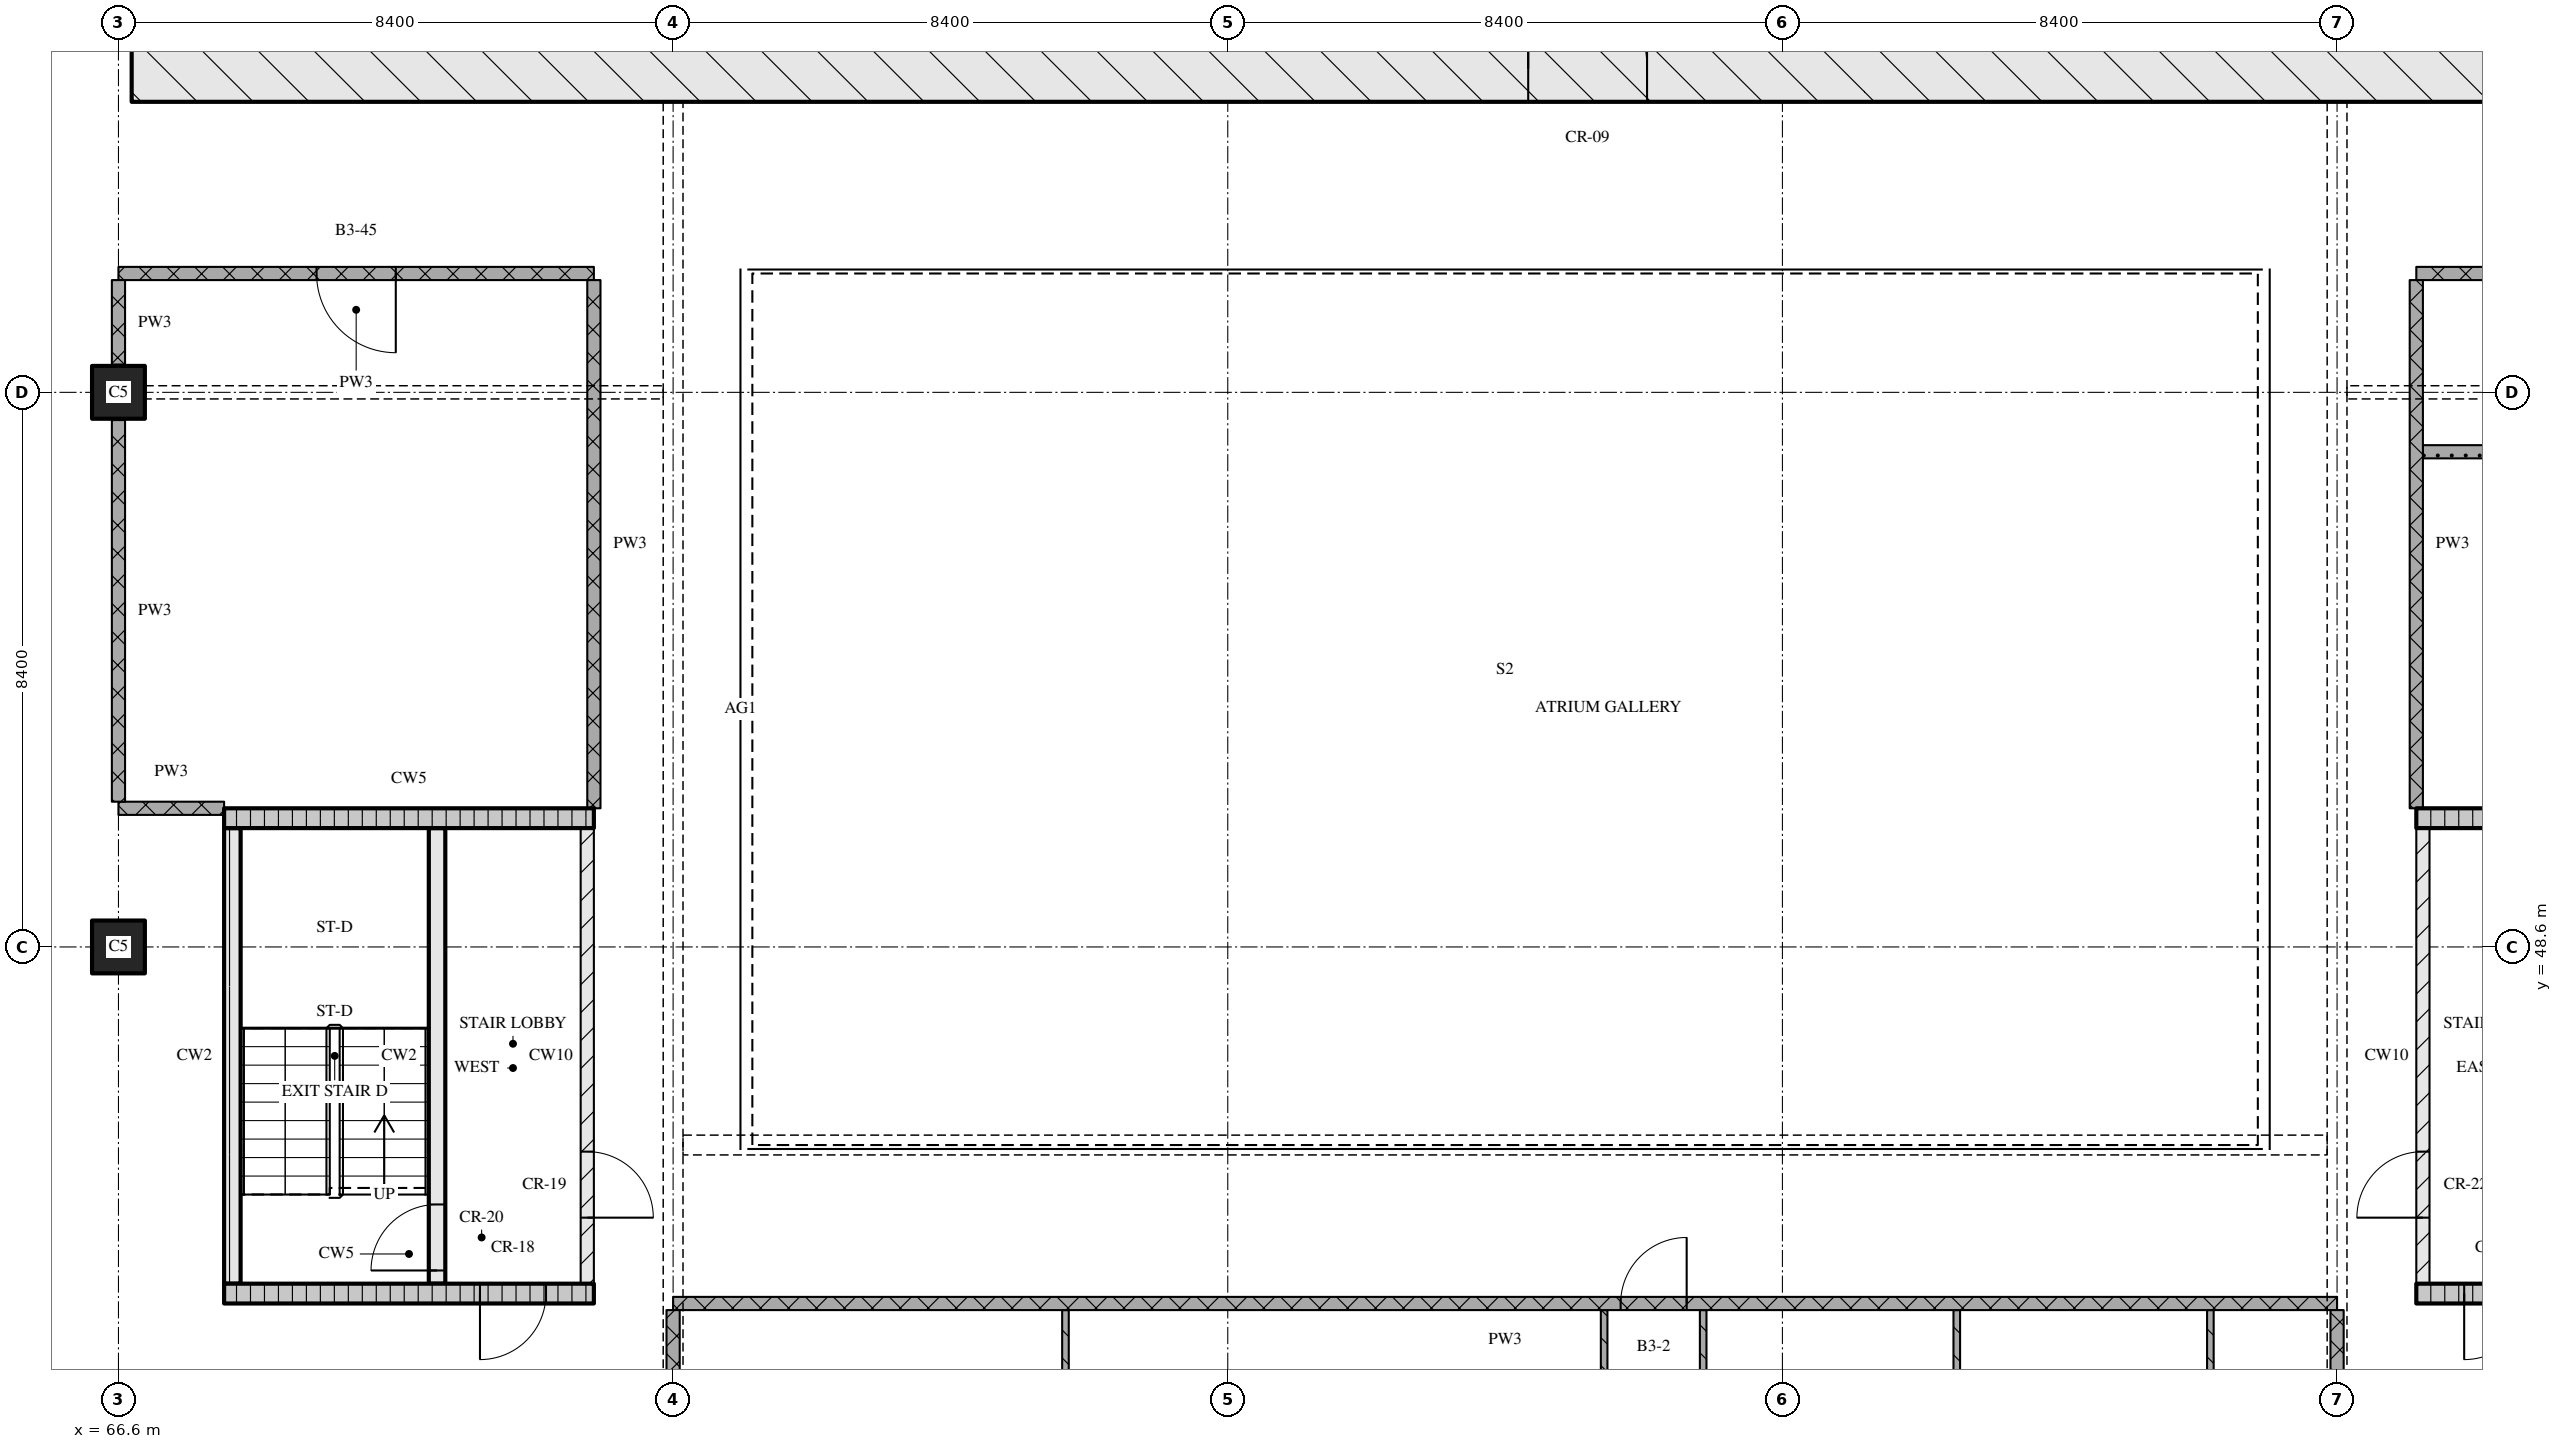
"""IFC4 building model, lengths in metres.
Left out: names, types, materials, properties, quantities, classifications, styles, units other than length and angle.
Written with IfcOpenShell. Run it as: python <this file> out.ifc"""

import sys

from ifc_helpers import new_model, si_unit, direction, frame, frame_2d, origin, origin_2d, place, context, subcontext, project, spatial, rectangle, extrude, element, fill, save


model = new_model("IFC4")
c1 = context("Model", 3, precision=1e-05, world=origin(), true_north=direction((0.0, 1.0)))
c2 = subcontext(c1, "Body", "Model", "MODEL_VIEW")
j1 = project(units=[si_unit("LENGTHUNIT", "METRE"), si_unit("PLANEANGLEUNIT", "RADIAN")], contexts=[c1])
p1 = place(None, origin())
s1 = spatial("IfcSite", under=j1, at=p1, CompositionType="ELEMENT")
p2 = place(p1, origin())
s2 = spatial("IfcBuilding", under=s1, at=p2, CompositionType="ELEMENT")
p3 = place(p2, frame((0.0, 0.0, 116.85)))
s3 = spatial("IfcBuildingStorey", under=s2, at=p3, CompositionType="ELEMENT", Elevation=116.85)
for number, where, z_axis, x_axis in (
    (1, (66.6, 48.6, 0.0), (0.0, 0.0, 1.0), (1.0, 0.0, 0.0)),
    (2, (66.6, 57.0, 0.0), (0.0, 0.0, 1.0), (1.0, 0.0, 0.0)),
):
    element("IfcColumn", number, at=place(p3, frame(where, z_axis=z_axis, x_axis=x_axis)), inside=s3, PredefinedType="COLUMN", context=c2, shape_type="SweptSolid", body=[
        extrude(rectangle(XDim=0.8, YDim=0.8, at=origin_2d()), origin(), (0.0, 0.0, 1.0), 3.6),
    ])
p4 = place(p3, frame((66.8, 61.9, 0.0), z_axis=(0.0, 0.0, 1.0), x_axis=(1.0, 0.0, 0.0)))
e3 = element("IfcWall", 3, at=p4, inside=s3, PredefinedType="SOLIDWALL", context=c2, shape_type="SweptSolid", body=[
    extrude(rectangle(XDim=41.6, YDim=1.0, at=frame_2d((20.8, 0.0))), origin(), (0.0, 0.0, 1.0), 3.32),
])
p5 = place(p4, frame((21.15, 0.0, 0.0)))
e4 = element("IfcOpeningElement", 4, at=p5, cuts=e3, PredefinedType="OPENING", context=c2, shape_type="SweptSolid", body=[
    extrude(rectangle(XDim=1.8, YDim=2.1, at=frame_2d((0.9, 1.05))), frame((0.0, 0.51, 0.0), z_axis=(0.0, -1.0, 0.0), x_axis=(1.0, 0.0, 0.0)), (0.0, 0.0, 1.0), 1.02),
])
p6 = place(p3, frame((68.2, 43.35, 0.0), z_axis=(0.0, 0.0, 1.0), x_axis=(1.0, 0.0, 0.0)))
e5 = element("IfcWall", 5, at=p6, inside=s3, PredefinedType="SOLIDWALL", context=c2, shape_type="SweptSolid", body=[
    extrude(rectangle(XDim=5.6, YDim=0.3, at=frame_2d((2.8, 0.0))), origin(), (0.0, 0.0, 1.0), 3.32),
])
p7 = place(p6, frame((3.875, 0.0, 0.0)))
e6 = element("IfcOpeningElement", 6, at=p7, cuts=e5, PredefinedType="OPENING", context=c2, shape_type="SweptSolid", body=[
    extrude(rectangle(XDim=1.0, YDim=2.1, at=frame_2d((0.5, 1.05))), frame((0.0, 0.16, 0.0), z_axis=(0.0, -1.0, 0.0), x_axis=(1.0, 0.0, 0.0)), (0.0, 0.0, 1.0), 0.32),
])
p8 = place(p3, frame((68.325, 43.5, 0.0), z_axis=(0.0, 0.0, 1.0), x_axis=(0.0, 1.0, 0.0)))
e7 = element("IfcWall", 7, at=p8, inside=s3, PredefinedType="SOLIDWALL", context=c2, shape_type="SweptSolid", body=[
    extrude(rectangle(XDim=6.9, YDim=0.25, at=frame_2d((3.45, 0.0))), origin(), (0.0, 0.0, 1.0), 3.32),
])
p9 = place(p3, frame((71.425, 43.5, 0.0), z_axis=(0.0, 0.0, 1.0), x_axis=(0.0, 1.0, 0.0)))
e8 = element("IfcWall", 8, at=p9, inside=s3, PredefinedType="SOLIDWALL", context=c2, shape_type="SweptSolid", body=[
    extrude(rectangle(XDim=6.9, YDim=0.25, at=frame_2d((3.45, 0.0))), origin(), (0.0, 0.0, 1.0), 3.32),
])
p10 = place(p9, frame((0.2, 0.0, 0.0)))
e9 = element("IfcOpeningElement", 9, at=p10, cuts=e8, PredefinedType="OPENING", context=c2, shape_type="SweptSolid", body=[
    extrude(rectangle(XDim=1.0, YDim=2.1, at=frame_2d((0.5, 1.05))), frame((0.0, 0.135, 0.0), z_axis=(0.0, -1.0, 0.0), x_axis=(1.0, 0.0, 0.0)), (0.0, 0.0, 1.0), 0.27),
])
p11 = place(p3, frame((73.7, 43.5, 0.0), z_axis=(0.0, 0.0, 1.0), x_axis=(0.0, 1.0, 0.0)))
e10 = element("IfcWall", 10, at=p11, inside=s3, PredefinedType="PARTITIONING", context=c2, shape_type="SweptSolid", body=[
    extrude(rectangle(XDim=6.9, YDim=0.2, at=frame_2d((3.45, 0.0))), origin(), (0.0, 0.0, 1.0), 3.32),
])
p12 = place(p11, frame((1.0, 0.0, 0.0)))
e11 = element("IfcOpeningElement", 11, at=p12, cuts=e10, PredefinedType="OPENING", context=c2, shape_type="SweptSolid", body=[
    extrude(rectangle(XDim=1.0, YDim=2.1, at=frame_2d((0.5, 1.05))), frame((0.0, 0.11, 0.0), z_axis=(0.0, -1.0, 0.0), x_axis=(1.0, 0.0, 0.0)), (0.0, 0.0, 1.0), 0.22),
])
p13 = place(p3, frame((68.2, 50.55, 0.0), z_axis=(0.0, 0.0, 1.0), x_axis=(1.0, 0.0, 0.0)))
e12 = element("IfcWall", 12, at=p13, inside=s3, PredefinedType="SOLIDWALL", context=c2, shape_type="SweptSolid", body=[
    extrude(rectangle(XDim=5.6, YDim=0.3, at=frame_2d((2.8, 0.0))), origin(), (0.0, 0.0, 1.0), 3.32),
])
p14 = place(p3, frame((101.4, 43.35, 0.0), z_axis=(0.0, 0.0, 1.0), x_axis=(1.0, 0.0, 0.0)))
e13 = element("IfcWall", 13, at=p14, inside=s3, PredefinedType="SOLIDWALL", context=c2, shape_type="SweptSolid", body=[
    extrude(rectangle(XDim=5.6, YDim=0.3, at=frame_2d((2.8, 0.0))), origin(), (0.0, 0.0, 1.0), 3.32),
])
p15 = place(p14, frame((0.725, 0.0, 0.0)))
e14 = element("IfcOpeningElement", 14, at=p15, cuts=e13, PredefinedType="OPENING", context=c2, shape_type="SweptSolid", body=[
    extrude(rectangle(XDim=1.0, YDim=2.1, at=frame_2d((0.5, 1.05))), frame((0.0, 0.16, 0.0), z_axis=(0.0, -1.0, 0.0), x_axis=(1.0, 0.0, 0.0)), (0.0, 0.0, 1.0), 0.32),
])
p16 = place(p3, frame((101.5, 43.5, 0.0), z_axis=(0.0, 0.0, 1.0), x_axis=(0.0, 1.0, 0.0)))
e15 = element("IfcWall", 15, at=p16, inside=s3, PredefinedType="PARTITIONING", context=c2, shape_type="SweptSolid", body=[
    extrude(rectangle(XDim=6.9, YDim=0.2, at=frame_2d((3.45, 0.0))), origin(), (0.0, 0.0, 1.0), 3.32),
])
p17 = place(p16, frame((1.0, 0.0, 0.0)))
e16 = element("IfcOpeningElement", 16, at=p17, cuts=e15, PredefinedType="OPENING", context=c2, shape_type="SweptSolid", body=[
    extrude(rectangle(XDim=1.0, YDim=2.1, at=frame_2d((0.5, 1.05))), frame((0.0, 0.11, 0.0), z_axis=(0.0, -1.0, 0.0), x_axis=(1.0, 0.0, 0.0)), (0.0, 0.0, 1.0), 0.22),
])
p18 = place(p3, frame((101.4, 50.55, 0.0), z_axis=(0.0, 0.0, 1.0), x_axis=(1.0, 0.0, 0.0)))
e17 = element("IfcWall", 17, at=p18, inside=s3, PredefinedType="SOLIDWALL", context=c2, shape_type="SweptSolid", body=[
    extrude(rectangle(XDim=5.6, YDim=0.3, at=frame_2d((2.8, 0.0))), origin(), (0.0, 0.0, 1.0), 3.32),
])
p19 = place(p3, frame((100.2, 43.2, 0.0), z_axis=(0.0, 0.0, 1.0), x_axis=(-1.0, 0.0, 0.0)))
e18 = element("IfcWall", 18, at=p19, inside=s3, PredefinedType="PARTITIONING", context=c2, shape_type="SweptSolid", body=[
    extrude(rectangle(XDim=25.2, YDim=0.2, at=frame_2d((12.6, 0.0))), origin(), (0.0, 0.0, 1.0), 3.32),
])
p20 = place(p19, frame((9.85, 0.0, 0.0)))
e19 = element("IfcOpeningElement", 19, at=p20, cuts=e18, PredefinedType="OPENING", context=c2, shape_type="SweptSolid", body=[
    extrude(rectangle(XDim=1.0, YDim=2.1, at=frame_2d((0.5, 1.05))), frame((0.0, 0.11, 0.0), z_axis=(0.0, -1.0, 0.0), x_axis=(1.0, 0.0, 0.0)), (0.0, 0.0, 1.0), 0.22),
])
p21 = place(p3, frame((66.6, 50.7, 0.0), z_axis=(0.0, 0.0, 1.0), x_axis=(1.0, 0.0, 0.0)))
e20 = element("IfcWall", 20, at=p21, inside=s3, PredefinedType="PARTITIONING", context=c2, shape_type="SweptSolid", body=[
    extrude(rectangle(XDim=1.6, YDim=0.2, at=frame_2d((0.8, 0.0))), origin(), (0.0, 0.0, 1.0), 3.32),
])
p22 = place(p3, frame((101.5, 56.1, 0.0), z_axis=(0.0, 0.0, 1.0), x_axis=(1.0, 0.0, 0.0)))
e21 = element("IfcWall", 21, at=p22, inside=s3, PredefinedType="PARTITIONING", context=c2, shape_type="SweptSolid", body=[
    extrude(rectangle(XDim=7.0, YDim=0.2, at=frame_2d((3.5, 0.0))), origin(), (0.0, 0.0, 1.0), 3.32),
])
p23 = place(p3, frame((73.8, 58.8, 0.0), z_axis=(0.0, 0.0, 1.0), x_axis=(-1.0, 0.0, 0.0)))
e22 = element("IfcWall", 22, at=p23, inside=s3, PredefinedType="PARTITIONING", context=c2, shape_type="SweptSolid", body=[
    extrude(rectangle(XDim=7.2, YDim=0.2, at=frame_2d((3.6, 0.0))), origin(), (0.0, 0.0, 1.0), 3.32),
])
p24 = place(p23, frame((3.0, 0.0, 0.0)))
e23 = element("IfcOpeningElement", 23, at=p24, cuts=e22, PredefinedType="OPENING", context=c2, shape_type="SweptSolid", body=[
    extrude(rectangle(XDim=1.2, YDim=2.1, at=frame_2d((0.6, 1.05))), frame((0.0, 0.11, 0.0), z_axis=(0.0, -1.0, 0.0), x_axis=(1.0, 0.0, 0.0)), (0.0, 0.0, 1.0), 0.22),
])
p25 = place(p3, frame((101.4, 58.8, 0.0), z_axis=(0.0, 0.0, 1.0), x_axis=(1.0, 0.0, 0.0)))
e24 = element("IfcWall", 24, at=p25, inside=s3, PredefinedType="PARTITIONING", context=c2, shape_type="SweptSolid", body=[
    extrude(rectangle(XDim=7.2, YDim=0.2, at=frame_2d((3.6, 0.0))), origin(), (0.0, 0.0, 1.0), 3.32),
])
p26 = place(p3, frame((66.6, 56.58, 0.0), z_axis=(0.0, 0.0, 1.0), x_axis=(0.0, -1.0, 0.0)))
e25 = element("IfcWall", 25, at=p26, inside=s3, PredefinedType="PARTITIONING", context=c2, shape_type="SweptSolid", body=[
    extrude(rectangle(XDim=5.78, YDim=0.2, at=frame_2d((2.89, 0.0))), origin(), (0.0, 0.0, 1.0), 3.32),
])
p27 = place(p3, frame((66.6, 58.7, 0.0), z_axis=(0.0, 0.0, 1.0), x_axis=(0.0, -1.0, 0.0)))
e26 = element("IfcWall", 26, at=p27, inside=s3, PredefinedType="PARTITIONING", context=c2, shape_type="SweptSolid", body=[
    extrude(rectangle(XDim=1.28, YDim=0.2, at=frame_2d((0.64, 0.0))), origin(), (0.0, 0.0, 1.0), 3.32),
])
p28 = place(p3, frame((73.8, 58.7, 0.0), z_axis=(0.0, 0.0, 1.0), x_axis=(0.0, -1.0, 0.0)))
e27 = element("IfcWall", 27, at=p28, inside=s3, PredefinedType="PARTITIONING", context=c2, shape_type="SweptSolid", body=[
    extrude(rectangle(XDim=8.0, YDim=0.2, at=frame_2d((4.0, 0.0))), origin(), (0.0, 0.0, 1.0), 3.32),
])
p29 = place(p3, frame((75.0, 43.1, 0.0), z_axis=(0.0, 0.0, 1.0), x_axis=(0.0, -1.0, 0.0)))
e28 = element("IfcWall", 28, at=p29, inside=s3, PredefinedType="PARTITIONING", context=c2, shape_type="SweptSolid", body=[
    extrude(rectangle(XDim=2.2, YDim=0.2, at=frame_2d((1.1, 0.0))), origin(), (0.0, 0.0, 1.0), 2.43),
])
p30 = place(p3, frame((80.942, 43.1, 0.0), z_axis=(0.0, 0.0, 1.0), x_axis=(0.0, -1.0, 0.0)))
e29 = element("IfcWall", 29, at=p30, inside=s3, PredefinedType="PARTITIONING", context=c2, shape_type="SweptSolid", body=[
    extrude(rectangle(XDim=6.75, YDim=0.1, at=frame_2d((3.375, 0.0))), origin(), (0.0, 0.0, 1.0), 3.32),
])
p31 = place(p3, frame((89.1, 36.35, 0.0), z_axis=(0.0, 0.0, 1.0), x_axis=(0.0, 1.0, 0.0)))
e30 = element("IfcWall", 30, at=p31, inside=s3, PredefinedType="PARTITIONING", context=c2, shape_type="SweptSolid", body=[
    extrude(rectangle(XDim=6.75, YDim=0.1, at=frame_2d((3.375, 0.0))), origin(), (0.0, 0.0, 1.0), 3.32),
])
p32 = place(p31, frame((2.95, 0.0, 0.0)))
e31 = element("IfcOpeningElement", 31, at=p32, cuts=e30, PredefinedType="OPENING", context=c2, shape_type="SweptSolid", body=[
    extrude(rectangle(XDim=0.9, YDim=2.1, at=frame_2d((0.45, 1.05))), frame((0.0, 0.06, 0.0), z_axis=(0.0, -1.0, 0.0), x_axis=(1.0, 0.0, 0.0)), (0.0, 0.0, 1.0), 0.12),
])
p33 = place(p3, frame((90.6, 43.1, 0.0), z_axis=(0.0, 0.0, 1.0), x_axis=(0.0, -1.0, 0.0)))
e32 = element("IfcWall", 32, at=p33, inside=s3, PredefinedType="PARTITIONING", context=c2, shape_type="SweptSolid", body=[
    extrude(rectangle(XDim=6.75, YDim=0.1, at=frame_2d((3.375, 0.0))), origin(), (0.0, 0.0, 1.0), 3.32),
])
p34 = place(p33, frame((3.4, 0.0, 0.0)))
e33 = element("IfcOpeningElement", 33, at=p34, cuts=e32, PredefinedType="OPENING", context=c2, shape_type="SweptSolid", body=[
    extrude(rectangle(XDim=0.8, YDim=2.1, at=frame_2d((0.4, 1.05))), frame((0.0, 0.06, 0.0), z_axis=(0.0, -1.0, 0.0), x_axis=(1.0, 0.0, 0.0)), (0.0, 0.0, 1.0), 0.12),
])
for number, where, z_axis, x_axis in (
    (34, (94.441, 43.1, 0.0), (0.0, 0.0, 1.0), (0.0, -1.0, 0.0)),
    (35, (98.281, 43.1, 0.0), (0.0, 0.0, 1.0), (0.0, -1.0, 0.0)),
):
    element("IfcWall", number, at=place(p3, frame(where, z_axis=z_axis, x_axis=x_axis)), inside=s3, PredefinedType="PARTITIONING", context=c2, shape_type="SweptSolid", body=[
        extrude(rectangle(XDim=6.75, YDim=0.1, at=frame_2d((3.375, 0.0))), origin(), (0.0, 0.0, 1.0), 3.32),
    ])
p35 = place(p3, frame((100.2, 43.1, 0.0), z_axis=(0.0, 0.0, 1.0), x_axis=(0.0, -1.0, 0.0)))
e36 = element("IfcWall", 36, at=p35, inside=s3, PredefinedType="PARTITIONING", context=c2, shape_type="SweptSolid", body=[
    extrude(rectangle(XDim=2.2, YDim=0.2, at=frame_2d((1.1, 0.0))), origin(), (0.0, 0.0, 1.0), 2.43),
])
p36 = place(p3, frame((101.4, 58.7, 0.0), z_axis=(0.0, 0.0, 1.0), x_axis=(0.0, -1.0, 0.0)))
e37 = element("IfcWall", 37, at=p36, inside=s3, PredefinedType="PARTITIONING", context=c2, shape_type="SweptSolid", body=[
    extrude(rectangle(XDim=8.0, YDim=0.2, at=frame_2d((4.0, 0.0))), origin(), (0.0, 0.0, 1.0), 3.32),
])
p37 = place(p5, origin())
e38 = element("IfcDoor", 38, at=p37, inside=s3, OperationType="DOUBLE_DOOR_SINGLE_SWING", PredefinedType="DOOR", context=c2, shape_type="SweptSolid", body=[
    extrude(rectangle(XDim=1.8, YDim=2.1, at=frame_2d((0.9, 1.05))), frame((0.0, 0.025, 0.0), z_axis=(0.0, -1.0, 0.0), x_axis=(1.0, 0.0, 0.0)), (0.0, 0.0, 1.0), 0.05),
])
fill(e4, e38)
p38 = place(p7, origin())
e39 = element("IfcDoor", 39, at=p38, inside=s3, OperationType="SINGLE_SWING_RIGHT", PredefinedType="DOOR", context=c2, shape_type="SweptSolid", body=[
    extrude(rectangle(XDim=1.0, YDim=2.1, at=frame_2d((0.5, 1.05))), frame((0.0, 0.025, 0.0), z_axis=(0.0, -1.0, 0.0), x_axis=(1.0, 0.0, 0.0)), (0.0, 0.0, 1.0), 0.05),
])
fill(e6, e39)
p39 = place(p10, origin())
e40 = element("IfcDoor", 40, at=p39, inside=s3, OperationType="SINGLE_SWING_LEFT", PredefinedType="DOOR", context=c2, shape_type="SweptSolid", body=[
    extrude(rectangle(XDim=1.0, YDim=2.1, at=frame_2d((0.5, 1.05))), frame((0.0, 0.025, 0.0), z_axis=(0.0, -1.0, 0.0), x_axis=(1.0, 0.0, 0.0)), (0.0, 0.0, 1.0), 0.05),
])
fill(e9, e40)
p40 = place(p12, origin())
e41 = element("IfcDoor", 41, at=p40, inside=s3, OperationType="SINGLE_SWING_RIGHT", PredefinedType="DOOR", context=c2, shape_type="SweptSolid", body=[
    extrude(rectangle(XDim=1.0, YDim=2.1, at=frame_2d((0.5, 1.05))), frame((0.0, 0.025, 0.0), z_axis=(0.0, -1.0, 0.0), x_axis=(1.0, 0.0, 0.0)), (0.0, 0.0, 1.0), 0.05),
])
fill(e11, e41)
p41 = place(p15, origin())
e42 = element("IfcDoor", 42, at=p41, inside=s3, OperationType="SINGLE_SWING_RIGHT", PredefinedType="DOOR", context=c2, shape_type="SweptSolid", body=[
    extrude(rectangle(XDim=1.0, YDim=2.1, at=frame_2d((0.5, 1.05))), frame((0.0, 0.025, 0.0), z_axis=(0.0, -1.0, 0.0), x_axis=(1.0, 0.0, 0.0)), (0.0, 0.0, 1.0), 0.05),
])
fill(e14, e42)
p42 = place(p17, origin())
e43 = element("IfcDoor", 43, at=p42, inside=s3, OperationType="SINGLE_SWING_LEFT", PredefinedType="DOOR", context=c2, shape_type="SweptSolid", body=[
    extrude(rectangle(XDim=1.0, YDim=2.1, at=frame_2d((0.5, 1.05))), frame((0.0, 0.025, 0.0), z_axis=(0.0, -1.0, 0.0), x_axis=(1.0, 0.0, 0.0)), (0.0, 0.0, 1.0), 0.05),
])
fill(e16, e43)
p43 = place(p20, origin())
e44 = element("IfcDoor", 44, at=p43, inside=s3, OperationType="SINGLE_SWING_RIGHT", PredefinedType="DOOR", context=c2, shape_type="SweptSolid", body=[
    extrude(rectangle(XDim=1.0, YDim=2.1, at=frame_2d((0.5, 1.05))), frame((0.0, 0.025, 0.0), z_axis=(0.0, -1.0, 0.0), x_axis=(1.0, 0.0, 0.0)), (0.0, 0.0, 1.0), 0.05),
])
fill(e19, e44)
p44 = place(p24, origin())
e45 = element("IfcDoor", 45, at=p44, inside=s3, OperationType="SINGLE_SWING_LEFT", PredefinedType="DOOR", context=c2, shape_type="SweptSolid", body=[
    extrude(rectangle(XDim=1.2, YDim=2.1, at=frame_2d((0.6, 1.05))), frame((0.0, 0.025, 0.0), z_axis=(0.0, -1.0, 0.0), x_axis=(1.0, 0.0, 0.0)), (0.0, 0.0, 1.0), 0.05),
])
fill(e23, e45)
save(model, sys.argv[1])
